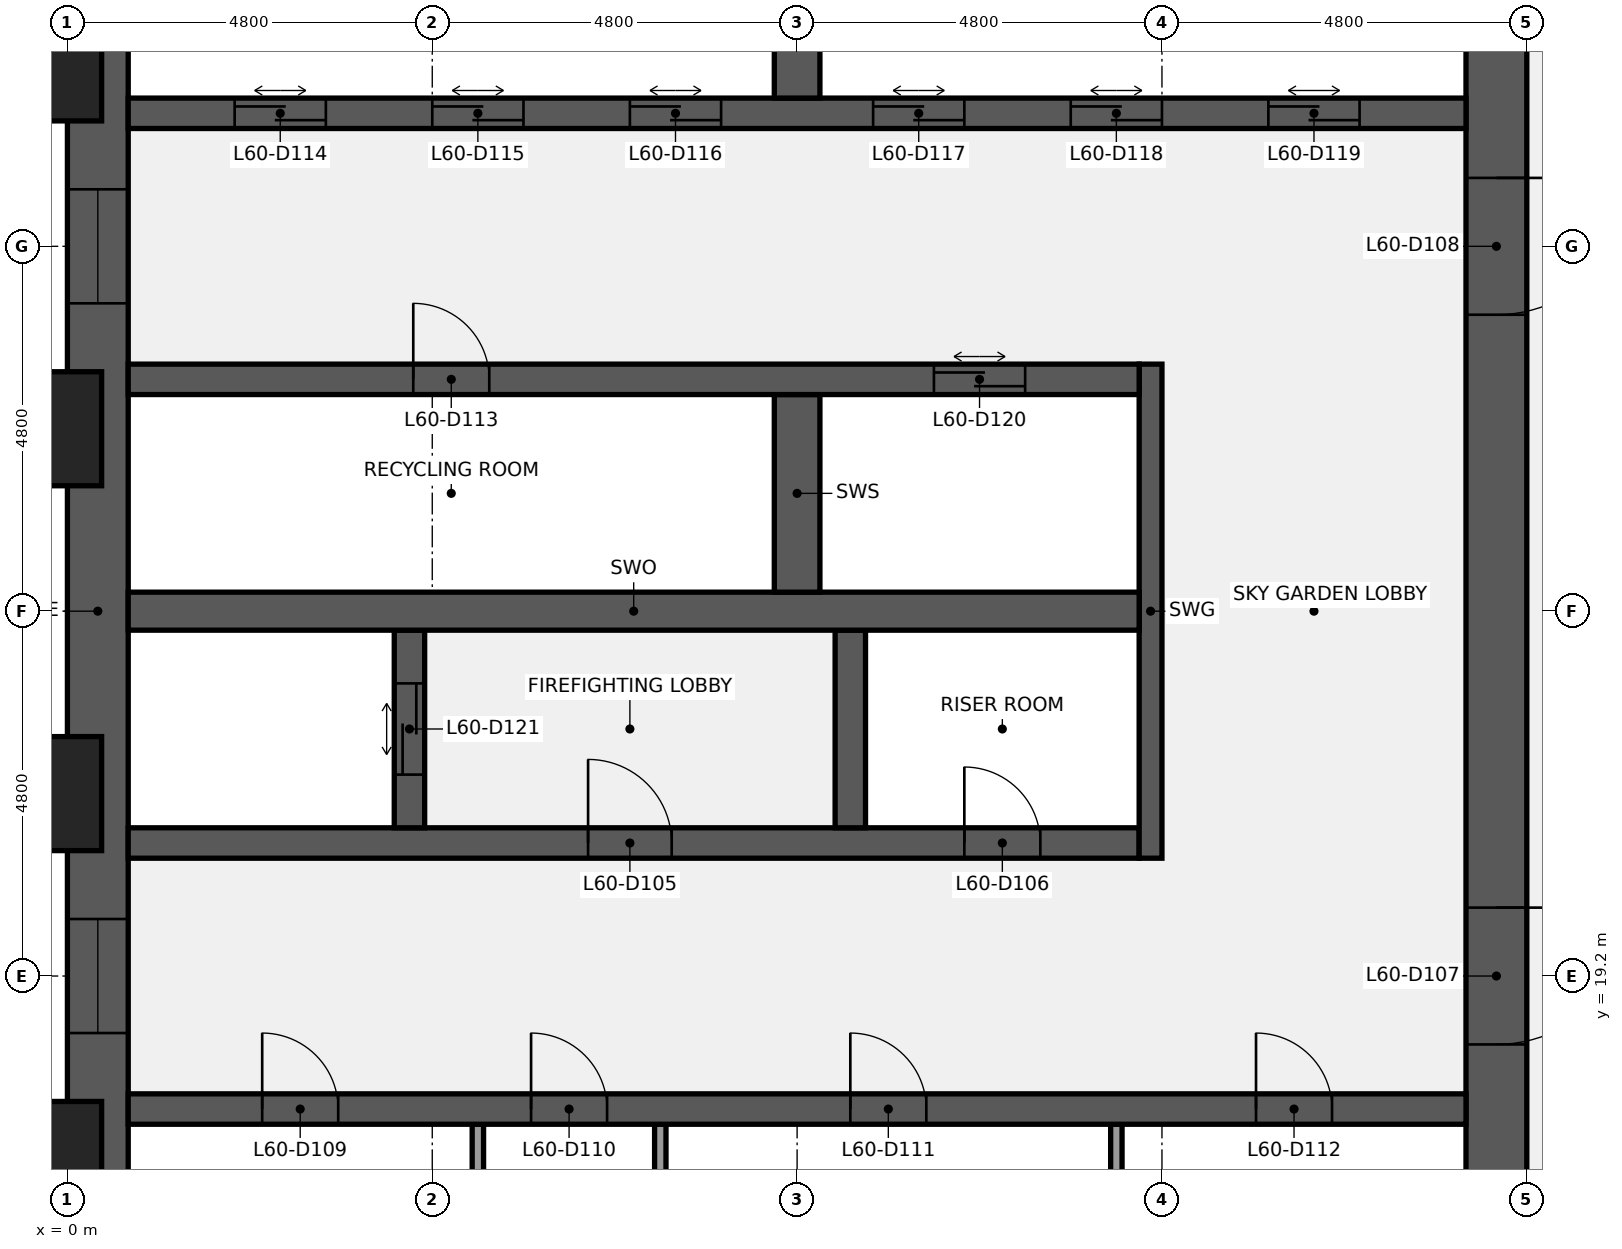
"""IFC4 building model, lengths in metres.
Left out: names, types, materials, properties, quantities, classifications, styles, units other than length and angle.
Written with IfcOpenShell. Run it as: python <this file> out.ifc"""

import sys

from ifc_helpers import new_model, si_unit, direction, frame, frame_2d, origin, origin_2d, place, context, subcontext, project, spatial, rectangle, extrude, element, fill, save


model = new_model("IFC4")
c1 = context("Model", 3, precision=1e-05, world=origin(), true_north=direction((0.0, 1.0)))
c2 = subcontext(c1, "Body", "Model", "MODEL_VIEW")
j1 = project(units=[si_unit("LENGTHUNIT", "METRE"), si_unit("PLANEANGLEUNIT", "RADIAN")], contexts=[c1])
p1 = place(None, origin())
s1 = spatial("IfcSite", under=j1, at=p1, CompositionType="ELEMENT")
p2 = place(p1, origin())
s2 = spatial("IfcBuilding", under=s1, at=p2, CompositionType="ELEMENT")
p3 = place(p2, frame((0.0, 0.0, 269.7)))
s3 = spatial("IfcBuildingStorey", under=s2, at=p3, CompositionType="ELEMENT", Elevation=269.7)
p4 = place(p3, frame((0.4, 9.6, 0.0), z_axis=(0.0, 0.0, 1.0), x_axis=(0.0, 1.0, 0.0)))
e1 = element("IfcWall", 1, at=p4, inside=s3, PredefinedType="SHEAR", context=c2, shape_type="SweptSolid", body=[
    extrude(rectangle(XDim=28.8, YDim=0.8, at=frame_2d((14.4, 0.0))), origin(), (0.0, 0.0, 1.0), 12.3),
])
p5 = place(p4, frame((8.85, 0.0, 0.9)))
e2 = element("IfcOpeningElement", 2, at=p5, cuts=e1, PredefinedType="OPENING", context=c2, shape_type="SweptSolid", body=[
    extrude(rectangle(XDim=1.5, YDim=6.3, at=frame_2d((0.75, 3.15))), frame((0.0, 0.41, 0.0), z_axis=(0.0, -1.0, 0.0), x_axis=(1.0, 0.0, 0.0)), (0.0, 0.0, 1.0), 0.82),
])
p6 = place(p4, frame((18.45, 0.0, 0.9)))
e3 = element("IfcOpeningElement", 3, at=p6, cuts=e1, PredefinedType="OPENING", context=c2, shape_type="SweptSolid", body=[
    extrude(rectangle(XDim=1.5, YDim=6.3, at=frame_2d((0.75, 3.15))), frame((0.0, 0.41, 0.0), z_axis=(0.0, -1.0, 0.0), x_axis=(1.0, 0.0, 0.0)), (0.0, 0.0, 1.0), 0.82),
])
p7 = place(p3, frame((18.8, 38.4, 0.0), z_axis=(0.0, 0.0, 1.0), x_axis=(0.0, -1.0, 0.0)))
e4 = element("IfcWall", 4, at=p7, inside=s3, PredefinedType="SHEAR", context=c2, shape_type="SweptSolid", body=[
    extrude(rectangle(XDim=28.8, YDim=0.8, at=frame_2d((14.4, 0.0))), origin(), (0.0, 0.0, 1.0), 12.3),
])
p8 = place(p7, frame((18.3, 0.0, 0.0)))
e5 = element("IfcOpeningElement", 5, at=p8, cuts=e4, PredefinedType="OPENING", context=c2, shape_type="SweptSolid", body=[
    extrude(rectangle(XDim=1.8, YDim=2.1, at=frame_2d((0.9, 1.05))), frame((0.0, 0.41, 0.0), z_axis=(0.0, -1.0, 0.0), x_axis=(1.0, 0.0, 0.0)), (0.0, 0.0, 1.0), 0.82),
])
p9 = place(p7, frame((8.7, 0.0, 0.0)))
e6 = element("IfcOpeningElement", 6, at=p9, cuts=e4, PredefinedType="OPENING", context=c2, shape_type="SweptSolid", body=[
    extrude(rectangle(XDim=1.8, YDim=2.1, at=frame_2d((0.9, 1.05))), frame((0.0, 0.41, 0.0), z_axis=(0.0, -1.0, 0.0), x_axis=(1.0, 0.0, 0.0)), (0.0, 0.0, 1.0), 0.82),
])
for number, where, z_axis, x_axis in (
    (7, (5.4, 14.65, 0.0), (0.0, 0.0, 1.0), (0.0, 1.0, 0.0)),
    (8, (7.8, 14.65, 0.0), (0.0, 0.0, 1.0), (0.0, 1.0, 0.0)),
    (9, (13.8, 14.65, 0.0), (0.0, 0.0, 1.0), (0.0, 1.0, 0.0)),
):
    element("IfcWall", number, at=place(p3, frame(where, z_axis=z_axis, x_axis=x_axis)), inside=s3, PredefinedType="PARTITIONING", context=c2, shape_type="SweptSolid", body=[
        extrude(rectangle(XDim=2.6, YDim=0.15, at=frame_2d((1.3, 0.0))), origin(), (0.0, 0.0, 1.0), 12.3),
    ])
p10 = place(p3, frame((0.8, 17.45, 0.0), z_axis=(0.0, 0.0, 1.0), x_axis=(1.0, 0.0, 0.0)))
e10 = element("IfcWall", 10, at=p10, inside=s3, PredefinedType="SHEAR", context=c2, shape_type="SweptSolid", body=[
    extrude(rectangle(XDim=17.6, YDim=0.4, at=frame_2d((8.8, 0.0))), origin(), (0.0, 0.0, 1.0), 12.3),
])
p11 = place(p10, frame((1.762, 0.0, 0.0)))
e11 = element("IfcOpeningElement", 11, at=p11, cuts=e10, PredefinedType="OPENING", context=c2, shape_type="SweptSolid", body=[
    extrude(rectangle(XDim=1.0, YDim=2.1, at=frame_2d((0.5, 1.05))), frame((0.0, 0.21, 0.0), z_axis=(0.0, -1.0, 0.0), x_axis=(1.0, 0.0, 0.0)), (0.0, 0.0, 1.0), 0.42),
])
p12 = place(p10, frame((5.3, 0.0, 0.0)))
e12 = element("IfcOpeningElement", 12, at=p12, cuts=e10, PredefinedType="OPENING", context=c2, shape_type="SweptSolid", body=[
    extrude(rectangle(XDim=1.0, YDim=2.1, at=frame_2d((0.5, 1.05))), frame((0.0, 0.21, 0.0), z_axis=(0.0, -1.0, 0.0), x_axis=(1.0, 0.0, 0.0)), (0.0, 0.0, 1.0), 0.42),
])
p13 = place(p10, frame((9.5, 0.0, 0.0)))
e13 = element("IfcOpeningElement", 13, at=p13, cuts=e10, PredefinedType="OPENING", context=c2, shape_type="SweptSolid", body=[
    extrude(rectangle(XDim=1.0, YDim=2.1, at=frame_2d((0.5, 1.05))), frame((0.0, 0.21, 0.0), z_axis=(0.0, -1.0, 0.0), x_axis=(1.0, 0.0, 0.0)), (0.0, 0.0, 1.0), 0.42),
])
p14 = place(p10, frame((14.837, 0.0, 0.0)))
e14 = element("IfcOpeningElement", 14, at=p14, cuts=e10, PredefinedType="OPENING", context=c2, shape_type="SweptSolid", body=[
    extrude(rectangle(XDim=1.0, YDim=2.1, at=frame_2d((0.5, 1.05))), frame((0.0, 0.21, 0.0), z_axis=(0.0, -1.0, 0.0), x_axis=(1.0, 0.0, 0.0)), (0.0, 0.0, 1.0), 0.42),
])
p15 = place(p3, frame((0.8, 20.95, 0.0), z_axis=(0.0, 0.0, 1.0), x_axis=(1.0, 0.0, 0.0)))
e15 = element("IfcWall", 15, at=p15, inside=s3, PredefinedType="SHEAR", context=c2, shape_type="SweptSolid", body=[
    extrude(rectangle(XDim=13.3, YDim=0.4, at=frame_2d((6.65, 0.0))), origin(), (0.0, 0.0, 1.0), 12.3),
])
p16 = place(p15, frame((6.05, 0.0, 0.0)))
e16 = element("IfcOpeningElement", 16, at=p16, cuts=e15, PredefinedType="OPENING", context=c2, shape_type="SweptSolid", body=[
    extrude(rectangle(XDim=1.1, YDim=2.1, at=frame_2d((0.55, 1.05))), frame((0.0, 0.21, 0.0), z_axis=(0.0, -1.0, 0.0), x_axis=(1.0, 0.0, 0.0)), (0.0, 0.0, 1.0), 0.42),
])
p17 = place(p15, frame((11.0, 0.0, 0.0)))
e17 = element("IfcOpeningElement", 17, at=p17, cuts=e15, PredefinedType="OPENING", context=c2, shape_type="SweptSolid", body=[
    extrude(rectangle(XDim=1.0, YDim=2.1, at=frame_2d((0.5, 1.05))), frame((0.0, 0.21, 0.0), z_axis=(0.0, -1.0, 0.0), x_axis=(1.0, 0.0, 0.0)), (0.0, 0.0, 1.0), 0.42),
])
p18 = place(p3, frame((14.25, 20.75, 0.0), z_axis=(0.0, 0.0, 1.0), x_axis=(0.0, 1.0, 0.0)))
e18 = element("IfcWall", 18, at=p18, inside=s3, PredefinedType="SHEAR", context=c2, shape_type="SweptSolid", body=[
    extrude(rectangle(XDim=6.5, YDim=0.3, at=frame_2d((3.25, 0.0))), origin(), (0.0, 0.0, 1.0), 12.3),
])
p19 = place(p3, frame((4.5, 21.15, 0.0), z_axis=(0.0, 0.0, 1.0), x_axis=(0.0, 1.0, 0.0)))
e19 = element("IfcWall", 19, at=p19, inside=s3, PredefinedType="SHEAR", context=c2, shape_type="SweptSolid", body=[
    extrude(rectangle(XDim=2.6, YDim=0.4, at=frame_2d((1.3, 0.0))), origin(), (0.0, 0.0, 1.0), 12.3),
])
p20 = place(p19, frame((0.7, 0.0, 0.0)))
e20 = element("IfcOpeningElement", 20, at=p20, cuts=e19, PredefinedType="OPENING", context=c2, shape_type="SweptSolid", body=[
    extrude(rectangle(XDim=1.2, YDim=2.1, at=frame_2d((0.6, 1.05))), frame((0.0, 0.21, 0.0), z_axis=(0.0, -1.0, 0.0), x_axis=(1.0, 0.0, 0.0)), (0.0, 0.0, 1.0), 0.42),
])
p21 = place(p3, frame((10.3, 21.15, 0.0), z_axis=(0.0, 0.0, 1.0), x_axis=(0.0, 1.0, 0.0)))
e21 = element("IfcWall", 21, at=p21, inside=s3, PredefinedType="SHEAR", context=c2, shape_type="SweptSolid", body=[
    extrude(rectangle(XDim=2.6, YDim=0.4, at=frame_2d((1.3, 0.0))), origin(), (0.0, 0.0, 1.0), 12.3),
])
p22 = place(p3, frame((0.8, 24.0, 0.0), z_axis=(0.0, 0.0, 1.0), x_axis=(1.0, 0.0, 0.0)))
e22 = element("IfcWall", 22, at=p22, inside=s3, PredefinedType="SHEAR", context=c2, shape_type="SweptSolid", body=[
    extrude(rectangle(XDim=13.3, YDim=0.5, at=frame_2d((6.65, 0.0))), origin(), (0.0, 0.0, 1.0), 12.3),
])
p23 = place(p3, frame((9.6, 24.25, 0.0), z_axis=(0.0, 0.0, 1.0), x_axis=(0.0, 1.0, 0.0)))
e23 = element("IfcWall", 23, at=p23, inside=s3, PredefinedType="SHEAR", context=c2, shape_type="SweptSolid", body=[
    extrude(rectangle(XDim=2.6, YDim=0.6, at=frame_2d((1.3, 0.0))), origin(), (0.0, 0.0, 1.0), 12.3),
])
p24 = place(p3, frame((0.8, 27.05, 0.0), z_axis=(0.0, 0.0, 1.0), x_axis=(1.0, 0.0, 0.0)))
e24 = element("IfcWall", 24, at=p24, inside=s3, PredefinedType="SHEAR", context=c2, shape_type="SweptSolid", body=[
    extrude(rectangle(XDim=13.3, YDim=0.4, at=frame_2d((6.65, 0.0))), origin(), (0.0, 0.0, 1.0), 12.3),
])
p25 = place(p24, frame((3.75, 0.0, 0.0)))
e25 = element("IfcOpeningElement", 25, at=p25, cuts=e24, PredefinedType="OPENING", context=c2, shape_type="SweptSolid", body=[
    extrude(rectangle(XDim=1.0, YDim=2.1, at=frame_2d((0.5, 1.05))), frame((0.0, 0.21, 0.0), z_axis=(0.0, -1.0, 0.0), x_axis=(1.0, 0.0, 0.0)), (0.0, 0.0, 1.0), 0.42),
])
p26 = place(p24, frame((10.6, 0.0, 0.0)))
e26 = element("IfcOpeningElement", 26, at=p26, cuts=e24, PredefinedType="OPENING", context=c2, shape_type="SweptSolid", body=[
    extrude(rectangle(XDim=1.2, YDim=2.1, at=frame_2d((0.6, 1.05))), frame((0.0, 0.21, 0.0), z_axis=(0.0, -1.0, 0.0), x_axis=(1.0, 0.0, 0.0)), (0.0, 0.0, 1.0), 0.42),
])
p27 = place(p3, frame((0.8, 30.55, 0.0), z_axis=(0.0, 0.0, 1.0), x_axis=(1.0, 0.0, 0.0)))
e27 = element("IfcWall", 27, at=p27, inside=s3, PredefinedType="SHEAR", context=c2, shape_type="SweptSolid", body=[
    extrude(rectangle(XDim=17.6, YDim=0.4, at=frame_2d((8.8, 0.0))), origin(), (0.0, 0.0, 1.0), 12.3),
])
p28 = place(p27, frame((1.4, 0.0, 0.0)))
e28 = element("IfcOpeningElement", 28, at=p28, cuts=e27, PredefinedType="OPENING", context=c2, shape_type="SweptSolid", body=[
    extrude(rectangle(XDim=1.2, YDim=2.1, at=frame_2d((0.6, 1.05))), frame((0.0, 0.21, 0.0), z_axis=(0.0, -1.0, 0.0), x_axis=(1.0, 0.0, 0.0)), (0.0, 0.0, 1.0), 0.42),
])
p29 = place(p27, frame((4.0, 0.0, 0.0)))
e29 = element("IfcOpeningElement", 29, at=p29, cuts=e27, PredefinedType="OPENING", context=c2, shape_type="SweptSolid", body=[
    extrude(rectangle(XDim=1.2, YDim=2.1, at=frame_2d((0.6, 1.05))), frame((0.0, 0.21, 0.0), z_axis=(0.0, -1.0, 0.0), x_axis=(1.0, 0.0, 0.0)), (0.0, 0.0, 1.0), 0.42),
])
p30 = place(p27, frame((6.6, 0.0, 0.0)))
e30 = element("IfcOpeningElement", 30, at=p30, cuts=e27, PredefinedType="OPENING", context=c2, shape_type="SweptSolid", body=[
    extrude(rectangle(XDim=1.2, YDim=2.1, at=frame_2d((0.6, 1.05))), frame((0.0, 0.21, 0.0), z_axis=(0.0, -1.0, 0.0), x_axis=(1.0, 0.0, 0.0)), (0.0, 0.0, 1.0), 0.42),
])
p31 = place(p27, frame((9.8, 0.0, 0.0)))
e31 = element("IfcOpeningElement", 31, at=p31, cuts=e27, PredefinedType="OPENING", context=c2, shape_type="SweptSolid", body=[
    extrude(rectangle(XDim=1.2, YDim=2.1, at=frame_2d((0.6, 1.05))), frame((0.0, 0.21, 0.0), z_axis=(0.0, -1.0, 0.0), x_axis=(1.0, 0.0, 0.0)), (0.0, 0.0, 1.0), 0.42),
])
p32 = place(p27, frame((12.4, 0.0, 0.0)))
e32 = element("IfcOpeningElement", 32, at=p32, cuts=e27, PredefinedType="OPENING", context=c2, shape_type="SweptSolid", body=[
    extrude(rectangle(XDim=1.2, YDim=2.1, at=frame_2d((0.6, 1.05))), frame((0.0, 0.21, 0.0), z_axis=(0.0, -1.0, 0.0), x_axis=(1.0, 0.0, 0.0)), (0.0, 0.0, 1.0), 0.42),
])
p33 = place(p27, frame((15.0, 0.0, 0.0)))
e33 = element("IfcOpeningElement", 33, at=p33, cuts=e27, PredefinedType="OPENING", context=c2, shape_type="SweptSolid", body=[
    extrude(rectangle(XDim=1.2, YDim=2.1, at=frame_2d((0.6, 1.05))), frame((0.0, 0.21, 0.0), z_axis=(0.0, -1.0, 0.0), x_axis=(1.0, 0.0, 0.0)), (0.0, 0.0, 1.0), 0.42),
])
p34 = place(p3, frame((9.6, 30.75, 0.0), z_axis=(0.0, 0.0, 1.0), x_axis=(0.0, 1.0, 0.0)))
e34 = element("IfcWall", 34, at=p34, inside=s3, PredefinedType="SHEAR", context=c2, shape_type="SweptSolid", body=[
    extrude(rectangle(XDim=2.6, YDim=0.6, at=frame_2d((1.3, 0.0))), origin(), (0.0, 0.0, 1.0), 12.3),
])
for number, where, z_axis, x_axis in (
    (35, (-0.75, 16.8, 0.0), (0.0, 0.0, 1.0), (0.0, 1.0, 0.0)),
    (36, (-0.75, 21.6, 0.0), (0.0, 0.0, 1.0), (0.0, 1.0, 0.0)),
    (37, (-0.75, 26.4, 0.0), (0.0, 0.0, 1.0), (0.0, 1.0, 0.0)),
    (38, (-0.75, 31.2, 0.0), (0.0, 0.0, 1.0), (0.0, 1.0, 0.0)),
):
    element("IfcColumn", number, at=place(p3, frame(where, z_axis=z_axis, x_axis=x_axis)), inside=s3, PredefinedType="PILASTER", context=c2, shape_type="SweptSolid", body=[
        extrude(rectangle(XDim=2.4, YDim=1.5, at=origin_2d()), origin(), (0.0, 0.0, 1.0), 12.6),
    ])
p35 = place(p16, origin())
e39 = element("IfcDoor", 39, at=p35, inside=s3, OperationType="SINGLE_SWING_LEFT", PredefinedType="DOOR", context=c2, shape_type="SweptSolid", body=[
    extrude(rectangle(XDim=1.1, YDim=2.1, at=frame_2d((0.55, 1.05))), frame((0.0, 0.025, 0.0), z_axis=(0.0, -1.0, 0.0), x_axis=(1.0, 0.0, 0.0)), (0.0, 0.0, 1.0), 0.05),
])
fill(e16, e39)
p36 = place(p17, origin())
e40 = element("IfcDoor", 40, at=p36, inside=s3, OperationType="SINGLE_SWING_LEFT", PredefinedType="DOOR", context=c2, shape_type="SweptSolid", body=[
    extrude(rectangle(XDim=1.0, YDim=2.1, at=frame_2d((0.5, 1.05))), frame((0.0, 0.025, 0.0), z_axis=(0.0, -1.0, 0.0), x_axis=(1.0, 0.0, 0.0)), (0.0, 0.0, 1.0), 0.05),
])
fill(e17, e40)
p37 = place(p8, origin())
e41 = element("IfcDoor", 41, at=p37, inside=s3, OperationType="DOUBLE_DOOR_SINGLE_SWING", PredefinedType="DOOR", context=c2, shape_type="SweptSolid", body=[
    extrude(rectangle(XDim=1.8, YDim=2.1, at=frame_2d((0.9, 1.05))), frame((0.0, 0.025, 0.0), z_axis=(0.0, -1.0, 0.0), x_axis=(1.0, 0.0, 0.0)), (0.0, 0.0, 1.0), 0.05),
])
fill(e5, e41)
p38 = place(p9, origin())
e42 = element("IfcDoor", 42, at=p38, inside=s3, OperationType="DOUBLE_DOOR_SINGLE_SWING", PredefinedType="DOOR", context=c2, shape_type="SweptSolid", body=[
    extrude(rectangle(XDim=1.8, YDim=2.1, at=frame_2d((0.9, 1.05))), frame((0.0, 0.025, 0.0), z_axis=(0.0, -1.0, 0.0), x_axis=(1.0, 0.0, 0.0)), (0.0, 0.0, 1.0), 0.05),
])
fill(e6, e42)
p39 = place(p11, origin())
e43 = element("IfcDoor", 43, at=p39, inside=s3, OperationType="SINGLE_SWING_LEFT", PredefinedType="DOOR", context=c2, shape_type="SweptSolid", body=[
    extrude(rectangle(XDim=1.0, YDim=2.1, at=frame_2d((0.5, 1.05))), frame((0.0, 0.025, 0.0), z_axis=(0.0, -1.0, 0.0), x_axis=(1.0, 0.0, 0.0)), (0.0, 0.0, 1.0), 0.05),
])
fill(e11, e43)
p40 = place(p12, origin())
e44 = element("IfcDoor", 44, at=p40, inside=s3, OperationType="SINGLE_SWING_LEFT", PredefinedType="DOOR", context=c2, shape_type="SweptSolid", body=[
    extrude(rectangle(XDim=1.0, YDim=2.1, at=frame_2d((0.5, 1.05))), frame((0.0, 0.025, 0.0), z_axis=(0.0, -1.0, 0.0), x_axis=(1.0, 0.0, 0.0)), (0.0, 0.0, 1.0), 0.05),
])
fill(e12, e44)
p41 = place(p13, origin())
e45 = element("IfcDoor", 45, at=p41, inside=s3, OperationType="SINGLE_SWING_LEFT", PredefinedType="DOOR", context=c2, shape_type="SweptSolid", body=[
    extrude(rectangle(XDim=1.0, YDim=2.1, at=frame_2d((0.5, 1.05))), frame((0.0, 0.025, 0.0), z_axis=(0.0, -1.0, 0.0), x_axis=(1.0, 0.0, 0.0)), (0.0, 0.0, 1.0), 0.05),
])
fill(e13, e45)
p42 = place(p14, origin())
e46 = element("IfcDoor", 46, at=p42, inside=s3, OperationType="SINGLE_SWING_LEFT", PredefinedType="DOOR", context=c2, shape_type="SweptSolid", body=[
    extrude(rectangle(XDim=1.0, YDim=2.1, at=frame_2d((0.5, 1.05))), frame((0.0, 0.025, 0.0), z_axis=(0.0, -1.0, 0.0), x_axis=(1.0, 0.0, 0.0)), (0.0, 0.0, 1.0), 0.05),
])
fill(e14, e46)
p43 = place(p25, origin())
e47 = element("IfcDoor", 47, at=p43, inside=s3, OperationType="SINGLE_SWING_LEFT", PredefinedType="DOOR", context=c2, shape_type="SweptSolid", body=[
    extrude(rectangle(XDim=1.0, YDim=2.1, at=frame_2d((0.5, 1.05))), frame((0.0, 0.025, 0.0), z_axis=(0.0, -1.0, 0.0), x_axis=(1.0, 0.0, 0.0)), (0.0, 0.0, 1.0), 0.05),
])
fill(e25, e47)
p44 = place(p28, origin())
e48 = element("IfcDoor", 48, at=p44, inside=s3, OperationType="DOUBLE_DOOR_SLIDING", PredefinedType="DOOR", context=c2, shape_type="SweptSolid", body=[
    extrude(rectangle(XDim=1.2, YDim=2.1, at=frame_2d((0.6, 1.05))), frame((0.0, 0.025, 0.0), z_axis=(0.0, -1.0, 0.0), x_axis=(1.0, 0.0, 0.0)), (0.0, 0.0, 1.0), 0.05),
])
fill(e28, e48)
p45 = place(p29, origin())
e49 = element("IfcDoor", 49, at=p45, inside=s3, OperationType="DOUBLE_DOOR_SLIDING", PredefinedType="DOOR", context=c2, shape_type="SweptSolid", body=[
    extrude(rectangle(XDim=1.2, YDim=2.1, at=frame_2d((0.6, 1.05))), frame((0.0, 0.025, 0.0), z_axis=(0.0, -1.0, 0.0), x_axis=(1.0, 0.0, 0.0)), (0.0, 0.0, 1.0), 0.05),
])
fill(e29, e49)
p46 = place(p30, origin())
e50 = element("IfcDoor", 50, at=p46, inside=s3, OperationType="DOUBLE_DOOR_SLIDING", PredefinedType="DOOR", context=c2, shape_type="SweptSolid", body=[
    extrude(rectangle(XDim=1.2, YDim=2.1, at=frame_2d((0.6, 1.05))), frame((0.0, 0.025, 0.0), z_axis=(0.0, -1.0, 0.0), x_axis=(1.0, 0.0, 0.0)), (0.0, 0.0, 1.0), 0.05),
])
fill(e30, e50)
p47 = place(p31, origin())
e51 = element("IfcDoor", 51, at=p47, inside=s3, OperationType="DOUBLE_DOOR_SLIDING", PredefinedType="DOOR", context=c2, shape_type="SweptSolid", body=[
    extrude(rectangle(XDim=1.2, YDim=2.1, at=frame_2d((0.6, 1.05))), frame((0.0, 0.025, 0.0), z_axis=(0.0, -1.0, 0.0), x_axis=(1.0, 0.0, 0.0)), (0.0, 0.0, 1.0), 0.05),
])
fill(e31, e51)
p48 = place(p32, origin())
e52 = element("IfcDoor", 52, at=p48, inside=s3, OperationType="DOUBLE_DOOR_SLIDING", PredefinedType="DOOR", context=c2, shape_type="SweptSolid", body=[
    extrude(rectangle(XDim=1.2, YDim=2.1, at=frame_2d((0.6, 1.05))), frame((0.0, 0.025, 0.0), z_axis=(0.0, -1.0, 0.0), x_axis=(1.0, 0.0, 0.0)), (0.0, 0.0, 1.0), 0.05),
])
fill(e32, e52)
p49 = place(p33, origin())
e53 = element("IfcDoor", 53, at=p49, inside=s3, OperationType="DOUBLE_DOOR_SLIDING", PredefinedType="DOOR", context=c2, shape_type="SweptSolid", body=[
    extrude(rectangle(XDim=1.2, YDim=2.1, at=frame_2d((0.6, 1.05))), frame((0.0, 0.025, 0.0), z_axis=(0.0, -1.0, 0.0), x_axis=(1.0, 0.0, 0.0)), (0.0, 0.0, 1.0), 0.05),
])
fill(e33, e53)
p50 = place(p26, origin())
e54 = element("IfcDoor", 54, at=p50, inside=s3, OperationType="DOUBLE_DOOR_SLIDING", PredefinedType="DOOR", context=c2, shape_type="SweptSolid", body=[
    extrude(rectangle(XDim=1.2, YDim=2.1, at=frame_2d((0.6, 1.05))), frame((0.0, 0.025, 0.0), z_axis=(0.0, -1.0, 0.0), x_axis=(1.0, 0.0, 0.0)), (0.0, 0.0, 1.0), 0.05),
])
fill(e26, e54)
p51 = place(p20, origin())
e55 = element("IfcDoor", 55, at=p51, inside=s3, OperationType="DOUBLE_DOOR_SLIDING", PredefinedType="DOOR", context=c2, shape_type="SweptSolid", body=[
    extrude(rectangle(XDim=1.2, YDim=2.1, at=frame_2d((0.6, 1.05))), frame((0.0, 0.025, 0.0), z_axis=(0.0, -1.0, 0.0), x_axis=(1.0, 0.0, 0.0)), (0.0, 0.0, 1.0), 0.05),
])
fill(e20, e55)
p52 = place(p5, origin())
e56 = element("IfcWindow", 56, at=p52, inside=s3, PartitioningType="SINGLE_PANEL", PredefinedType="WINDOW", context=c2, shape_type="SweptSolid", body=[
    extrude(rectangle(XDim=1.5, YDim=6.3, at=frame_2d((0.75, 3.15))), frame((0.0, 0.03, 0.0), z_axis=(0.0, -1.0, 0.0), x_axis=(1.0, 0.0, 0.0)), (0.0, 0.0, 1.0), 0.06),
])
fill(e2, e56)
p53 = place(p6, origin())
e57 = element("IfcWindow", 57, at=p53, inside=s3, PartitioningType="SINGLE_PANEL", PredefinedType="WINDOW", context=c2, shape_type="SweptSolid", body=[
    extrude(rectangle(XDim=1.5, YDim=6.3, at=frame_2d((0.75, 3.15))), frame((0.0, 0.03, 0.0), z_axis=(0.0, -1.0, 0.0), x_axis=(1.0, 0.0, 0.0)), (0.0, 0.0, 1.0), 0.06),
])
fill(e3, e57)
save(model, sys.argv[1])
